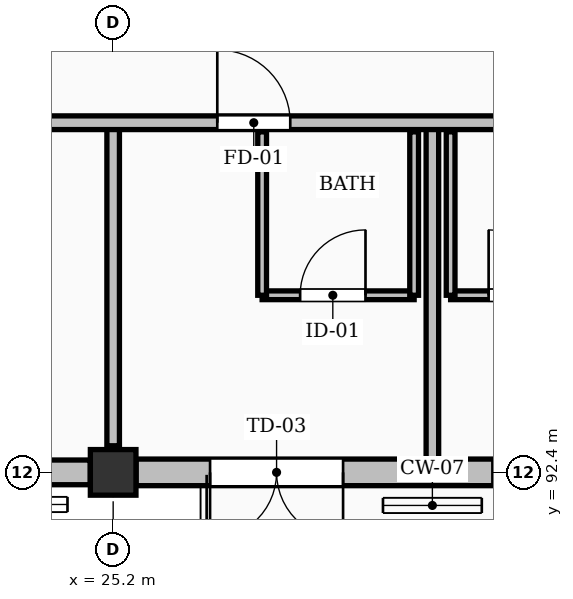
"""IFC4 building model, lengths in metres.
Left out: names, types, materials, properties, quantities, classifications, styles, units other than length and angle.
Written with IfcOpenShell. Run it as: python <this file> out.ifc"""

import sys

from ifc_helpers import new_model, si_unit, direction, frame, frame_2d, origin, origin_2d, place, context, subcontext, project, spatial, rectangle, extrude, element, fill, save


model = new_model("IFC4")
c1 = context("Model", 3, precision=1e-05, world=origin(), true_north=direction((0.0, 1.0)))
c2 = subcontext(c1, "Body", "Model", "MODEL_VIEW")
j1 = project(units=[si_unit("LENGTHUNIT", "METRE"), si_unit("PLANEANGLEUNIT", "RADIAN")], contexts=[c1])
p1 = place(None, origin())
s1 = spatial("IfcSite", under=j1, at=p1, CompositionType="ELEMENT")
p2 = place(p1, origin())
s2 = spatial("IfcBuilding", under=s1, at=p2, CompositionType="ELEMENT")
p3 = place(p2, frame((0.0, 0.0, 28.56)))
s3 = spatial("IfcBuildingStorey", under=s2, at=p3, CompositionType="ELEMENT", Elevation=28.56)
p4 = place(p3, frame((25.2, 92.4, 0.0), z_axis=(0.0, 0.0, 1.0), x_axis=(1.0, 0.0, 0.0)))
e1 = element("IfcColumn", 1, at=p4, inside=s3, PredefinedType="COLUMN", context=c2, shape_type="SweptSolid", body=[
    extrude(rectangle(XDim=0.6, YDim=0.6, at=origin_2d()), origin(), (0.0, 0.0, 1.0), 3.36),
])
p5 = place(p3, frame((17.101, 92.4, 0.0), z_axis=(0.0, 0.0, 1.0), x_axis=(1.0, 0.0, 0.0)))
e2 = element("IfcWall", 2, at=p5, inside=s3, PredefinedType="SOLIDWALL", context=c2, shape_type="SweptSolid", body=[
    extrude(rectangle(XDim=7.798, YDim=0.325, at=frame_2d((3.899, 0.0))), origin(), (0.0, 0.0, 1.0), 2.494),
])
p6 = place(p5, frame((0.599, 0.0, 0.25)))
e3 = element("IfcOpeningElement", 3, at=p6, cuts=e2, PredefinedType="OPENING", context=c2, shape_type="SweptSolid", body=[
    extrude(rectangle(XDim=2.4, YDim=1.75, at=frame_2d((1.2, 0.875))), frame((0.0, 0.172, 0.0), z_axis=(0.0, -1.0, 0.0), x_axis=(1.0, 0.0, 0.0)), (0.0, 0.0, 1.0), 0.345),
])
p7 = place(p5, frame((4.839, 0.0, 0.25)))
e4 = element("IfcOpeningElement", 4, at=p7, cuts=e2, PredefinedType="OPENING", context=c2, shape_type="SweptSolid", body=[
    extrude(rectangle(XDim=2.32, YDim=1.9, at=frame_2d((1.16, 0.95))), frame((0.0, 0.172, 0.0), z_axis=(0.0, -1.0, 0.0), x_axis=(1.0, 0.0, 0.0)), (0.0, 0.0, 1.0), 0.345),
])
p8 = place(p3, frame((25.501, 92.4, 0.0), z_axis=(0.0, 0.0, 1.0), x_axis=(1.0, 0.0, 0.0)))
e5 = element("IfcWall", 5, at=p8, inside=s3, PredefinedType="SOLIDWALL", context=c2, shape_type="SweptSolid", body=[
    extrude(rectangle(XDim=7.798, YDim=0.35, at=frame_2d((3.899, 0.0))), origin(), (0.0, 0.0, 1.0), 2.494),
])
p9 = place(p8, frame((0.974, 0.0, 0.0)))
e6 = element("IfcOpeningElement", 6, at=p9, cuts=e5, PredefinedType="OPENING", context=c2, shape_type="SweptSolid", body=[
    extrude(rectangle(XDim=1.75, YDim=2.08, at=frame_2d((0.875, 1.04))), frame((0.0, 0.185, 0.0), z_axis=(0.0, -1.0, 0.0), x_axis=(1.0, 0.0, 0.0)), (0.0, 0.0, 1.0), 0.37),
])
p10 = place(p8, frame((4.689, 0.0, 0.25)))
e7 = element("IfcOpeningElement", 7, at=p10, cuts=e5, PredefinedType="OPENING", context=c2, shape_type="SweptSolid", body=[
    extrude(rectangle(XDim=2.32, YDim=1.9, at=frame_2d((1.16, 0.95))), frame((0.0, 0.185, 0.0), z_axis=(0.0, -1.0, 0.0), x_axis=(1.0, 0.0, 0.0)), (0.0, 0.0, 1.0), 0.37),
])
p11 = place(p3, frame((27.16, 94.73, 0.0), z_axis=(0.0, 0.0, 1.0), x_axis=(1.0, 0.0, 0.0)))
e8 = element("IfcWall", 8, at=p11, inside=s3, PredefinedType="PARTITIONING", context=c2, shape_type="SweptSolid", body=[
    extrude(rectangle(XDim=2.0, YDim=0.115, at=frame_2d((1.0, 0.0))), origin(), (0.0, 0.0, 1.0), 3.12),
])
p12 = place(p11, frame((0.5, 0.0, 0.0)))
e9 = element("IfcOpeningElement", 9, at=p12, cuts=e8, PredefinedType="OPENING", context=c2, shape_type="SweptSolid", body=[
    extrude(rectangle(XDim=0.86, YDim=2.05, at=frame_2d((0.43, 1.025))), frame((0.0, 0.067, 0.0), z_axis=(0.0, -1.0, 0.0), x_axis=(1.0, 0.0, 0.0)), (0.0, 0.0, 1.0), 0.135),
])
for number, where, z_axis, x_axis in (
    (10, (27.16, 94.73, 0.0), (0.0, 0.0, 1.0), (0.0, 1.0, 0.0)),
    (11, (29.16, 94.73, 0.0), (0.0, 0.0, 1.0), (0.0, 1.0, 0.0)),
):
    element("IfcWall", number, at=place(p3, frame(where, z_axis=z_axis, x_axis=x_axis)), inside=s3, PredefinedType="PARTITIONING", context=c2, shape_type="SweptSolid", body=[
        extrude(rectangle(XDim=2.15, YDim=0.115, at=frame_2d((1.075, 0.0))), origin(), (0.0, 0.0, 1.0), 3.12),
    ])
p13 = place(p3, frame((29.64, 94.73, 0.0), z_axis=(0.0, 0.0, 1.0), x_axis=(1.0, 0.0, 0.0)))
e12 = element("IfcWall", 12, at=p13, inside=s3, PredefinedType="PARTITIONING", context=c2, shape_type="SweptSolid", body=[
    extrude(rectangle(XDim=2.0, YDim=0.115, at=frame_2d((1.0, 0.0))), origin(), (0.0, 0.0, 1.0), 3.12),
])
p14 = place(p13, frame((0.5, 0.0, 0.0)))
e13 = element("IfcOpeningElement", 13, at=p14, cuts=e12, PredefinedType="OPENING", context=c2, shape_type="SweptSolid", body=[
    extrude(rectangle(XDim=0.86, YDim=2.05, at=frame_2d((0.43, 1.025))), frame((0.0, 0.067, 0.0), z_axis=(0.0, -1.0, 0.0), x_axis=(1.0, 0.0, 0.0)), (0.0, 0.0, 1.0), 0.135),
])
p15 = place(p3, frame((29.64, 94.73, 0.0), z_axis=(0.0, 0.0, 1.0), x_axis=(0.0, 1.0, 0.0)))
e14 = element("IfcWall", 14, at=p15, inside=s3, PredefinedType="PARTITIONING", context=c2, shape_type="SweptSolid", body=[
    extrude(rectangle(XDim=2.15, YDim=0.115, at=frame_2d((1.075, 0.0))), origin(), (0.0, 0.0, 1.0), 3.12),
])
p16 = place(p3, frame((29.4, 92.575, 0.0), z_axis=(0.0, 0.0, 1.0), x_axis=(0.0, 1.0, 0.0)))
e15 = element("IfcWall", 15, at=p16, inside=s3, PredefinedType="PARTITIONING", context=c2, shape_type="SweptSolid", body=[
    extrude(rectangle(XDim=4.425, YDim=0.165, at=frame_2d((2.212, 0.0))), origin(), (0.0, 0.0, 1.0), 3.12),
])
p17 = place(p3, frame((25.2, 92.75, 0.0), z_axis=(0.0, 0.0, 1.0), x_axis=(0.0, 1.0, 0.0)))
e16 = element("IfcWall", 16, at=p17, inside=s3, PredefinedType="PARTITIONING", context=c2, shape_type="SweptSolid", body=[
    extrude(rectangle(XDim=4.25, YDim=0.165, at=frame_2d((2.125, 0.0))), origin(), (0.0, 0.0, 1.0), 2.455),
])
p18 = place(p3, frame((8.55, 97.0, 0.0), z_axis=(0.0, 0.0, 1.0), x_axis=(1.0, 0.0, 0.0)))
e17 = element("IfcWall", 17, at=p18, inside=s3, PredefinedType="PARTITIONING", context=c2, shape_type="SweptSolid", body=[
    extrude(rectangle(XDim=41.85, YDim=0.18, at=frame_2d((20.925, 0.0))), origin(), (0.0, 0.0, 1.0), 3.12),
])
p19 = place(p18, frame((1.22, 0.0, 0.0)))
e18 = element("IfcOpeningElement", 18, at=p19, cuts=e17, PredefinedType="OPENING", context=c2, shape_type="SweptSolid", body=[
    extrude(rectangle(XDim=0.96, YDim=2.15, at=frame_2d((0.48, 1.075))), frame((0.0, 0.1, 0.0), z_axis=(0.0, -1.0, 0.0), x_axis=(1.0, 0.0, 0.0)), (0.0, 0.0, 1.0), 0.2),
])
p20 = place(p18, frame((5.88, 0.0, 0.0)))
e19 = element("IfcOpeningElement", 19, at=p20, cuts=e17, PredefinedType="OPENING", context=c2, shape_type="SweptSolid", body=[
    extrude(rectangle(XDim=0.96, YDim=2.15, at=frame_2d((0.48, 1.075))), frame((0.0, 0.1, 0.0), z_axis=(0.0, -1.0, 0.0), x_axis=(1.0, 0.0, 0.0)), (0.0, 0.0, 1.0), 0.2),
])
p21 = place(p18, frame((9.62, 0.0, 0.0)))
e20 = element("IfcOpeningElement", 20, at=p21, cuts=e17, PredefinedType="OPENING", context=c2, shape_type="SweptSolid", body=[
    extrude(rectangle(XDim=0.96, YDim=2.15, at=frame_2d((0.48, 1.075))), frame((0.0, 0.1, 0.0), z_axis=(0.0, -1.0, 0.0), x_axis=(1.0, 0.0, 0.0)), (0.0, 0.0, 1.0), 0.2),
])
p22 = place(p18, frame((14.28, 0.0, 0.0)))
e21 = element("IfcOpeningElement", 21, at=p22, cuts=e17, PredefinedType="OPENING", context=c2, shape_type="SweptSolid", body=[
    extrude(rectangle(XDim=0.96, YDim=2.15, at=frame_2d((0.48, 1.075))), frame((0.0, 0.1, 0.0), z_axis=(0.0, -1.0, 0.0), x_axis=(1.0, 0.0, 0.0)), (0.0, 0.0, 1.0), 0.2),
])
p23 = place(p18, frame((18.02, 0.0, 0.0)))
e22 = element("IfcOpeningElement", 22, at=p23, cuts=e17, PredefinedType="OPENING", context=c2, shape_type="SweptSolid", body=[
    extrude(rectangle(XDim=0.96, YDim=2.15, at=frame_2d((0.48, 1.075))), frame((0.0, 0.1, 0.0), z_axis=(0.0, -1.0, 0.0), x_axis=(1.0, 0.0, 0.0)), (0.0, 0.0, 1.0), 0.2),
])
p24 = place(p18, frame((22.68, 0.0, 0.0)))
e23 = element("IfcOpeningElement", 23, at=p24, cuts=e17, PredefinedType="OPENING", context=c2, shape_type="SweptSolid", body=[
    extrude(rectangle(XDim=0.96, YDim=2.15, at=frame_2d((0.48, 1.075))), frame((0.0, 0.1, 0.0), z_axis=(0.0, -1.0, 0.0), x_axis=(1.0, 0.0, 0.0)), (0.0, 0.0, 1.0), 0.2),
])
p25 = place(p18, frame((28.45, 0.0, 0.0)))
e24 = element("IfcOpeningElement", 24, at=p25, cuts=e17, PredefinedType="OPENING", context=c2, shape_type="SweptSolid", body=[
    extrude(rectangle(XDim=1.62, YDim=2.2, at=frame_2d((0.81, 1.1))), frame((0.0, 0.1, 0.0), z_axis=(0.0, -1.0, 0.0), x_axis=(1.0, 0.0, 0.0)), (0.0, 0.0, 1.0), 0.2),
])
p26 = place(p18, frame((34.82, 0.0, 0.0)))
e25 = element("IfcOpeningElement", 25, at=p26, cuts=e17, PredefinedType="OPENING", context=c2, shape_type="SweptSolid", body=[
    extrude(rectangle(XDim=0.96, YDim=2.15, at=frame_2d((0.48, 1.075))), frame((0.0, 0.1, 0.0), z_axis=(0.0, -1.0, 0.0), x_axis=(1.0, 0.0, 0.0)), (0.0, 0.0, 1.0), 0.2),
])
p27 = place(p18, frame((39.48, 0.0, 0.0)))
e26 = element("IfcOpeningElement", 26, at=p27, cuts=e17, PredefinedType="OPENING", context=c2, shape_type="SweptSolid", body=[
    extrude(rectangle(XDim=0.96, YDim=2.15, at=frame_2d((0.48, 1.075))), frame((0.0, 0.1, 0.0), z_axis=(0.0, -1.0, 0.0), x_axis=(1.0, 0.0, 0.0)), (0.0, 0.0, 1.0), 0.2),
])
p28 = place(p9, frame((1.75, 0.0, 0.0), z_axis=(0.0, 0.0, 1.0), x_axis=(-1.0, 0.0, 0.0)))
e27 = element("IfcDoor", 27, at=p28, inside=s3, OperationType="DOUBLE_DOOR_SINGLE_SWING", PredefinedType="DOOR", context=c2, shape_type="SweptSolid", body=[
    extrude(rectangle(XDim=1.75, YDim=2.08, at=frame_2d((0.875, 1.04))), frame((0.0, 0.025, 0.0), z_axis=(0.0, -1.0, 0.0), x_axis=(1.0, 0.0, 0.0)), (0.0, 0.0, 1.0), 0.05),
])
fill(e6, e27)
p29 = place(p10, origin())
e28 = element("IfcWindow", 28, at=p29, inside=s3, PartitioningType="DOUBLE_PANEL_VERTICAL", PredefinedType="WINDOW", context=c2, shape_type="SweptSolid", body=[
    extrude(rectangle(XDim=2.32, YDim=1.9, at=frame_2d((1.16, 0.95))), frame((0.0, 0.03, 0.0), z_axis=(0.0, -1.0, 0.0), x_axis=(1.0, 0.0, 0.0)), (0.0, 0.0, 1.0), 0.06),
])
fill(e7, e28)
p30 = place(p12, origin())
e29 = element("IfcDoor", 29, at=p30, inside=s3, OperationType="SINGLE_SWING_RIGHT", PredefinedType="DOOR", context=c2, shape_type="SweptSolid", body=[
    extrude(rectangle(XDim=0.86, YDim=2.05, at=frame_2d((0.43, 1.025))), frame((0.0, 0.025, 0.0), z_axis=(0.0, -1.0, 0.0), x_axis=(1.0, 0.0, 0.0)), (0.0, 0.0, 1.0), 0.05),
])
fill(e9, e29)
p31 = place(p14, origin())
e30 = element("IfcDoor", 30, at=p31, inside=s3, OperationType="SINGLE_SWING_LEFT", PredefinedType="DOOR", context=c2, shape_type="SweptSolid", body=[
    extrude(rectangle(XDim=0.86, YDim=2.05, at=frame_2d((0.43, 1.025))), frame((0.0, 0.025, 0.0), z_axis=(0.0, -1.0, 0.0), x_axis=(1.0, 0.0, 0.0)), (0.0, 0.0, 1.0), 0.05),
])
fill(e13, e30)
p32 = place(p23, origin())
e31 = element("IfcDoor", 31, at=p32, inside=s3, OperationType="SINGLE_SWING_LEFT", PredefinedType="DOOR", context=c2, shape_type="SweptSolid", body=[
    extrude(rectangle(XDim=0.96, YDim=2.15, at=frame_2d((0.48, 1.075))), frame((0.0, 0.025, 0.0), z_axis=(0.0, -1.0, 0.0), x_axis=(1.0, 0.0, 0.0)), (0.0, 0.0, 1.0), 0.05),
])
fill(e22, e31)
save(model, sys.argv[1])
